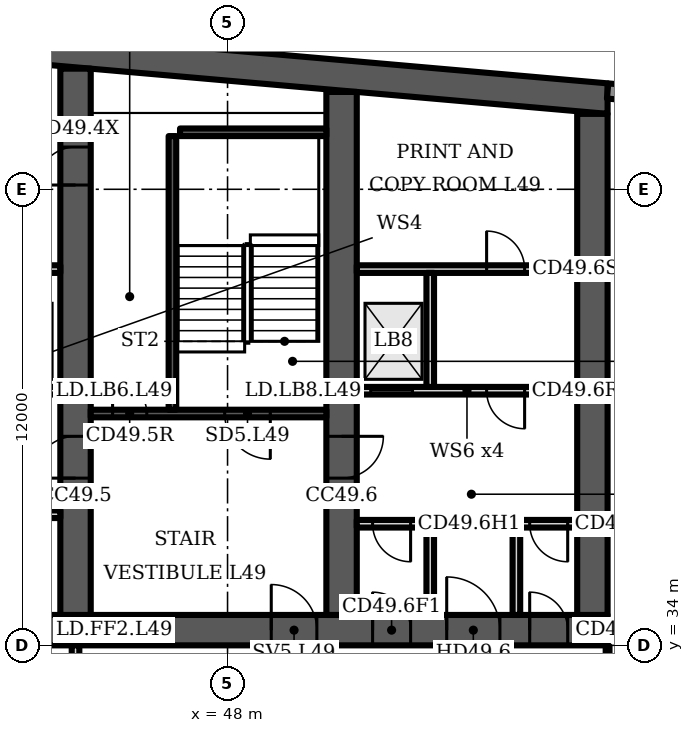
"""IFC4 building model, lengths in metres.
Left out: names, types, materials, properties, quantities, classifications, styles, units other than length and angle.
Written with IfcOpenShell. Run it as: python <this file> out.ifc"""

import sys

from ifc_helpers import new_model, si_unit, direction, frame, frame_2d, origin, place, context, subcontext, project, spatial, polyline, rectangle, outline, extrude, element, fill, save


model = new_model("IFC4")
c1 = context("Model", 3, precision=1e-05, world=origin(), true_north=direction((0.0, 1.0)))
c2 = subcontext(c1, "Body", "Model", "MODEL_VIEW")
j1 = project(units=[si_unit("LENGTHUNIT", "METRE"), si_unit("PLANEANGLEUNIT", "RADIAN")], contexts=[c1])
p1 = place(None, origin())
s1 = spatial("IfcSite", under=j1, at=p1, CompositionType="ELEMENT")
p2 = place(p1, origin())
s2 = spatial("IfcBuilding", under=s1, at=p2, CompositionType="ELEMENT")
p3 = place(p2, frame((0.0, 0.0, 198.7)))
s3 = spatial("IfcBuildingStorey", under=s2, at=p3, CompositionType="ELEMENT", Elevation=198.7)
p4 = place(p3, origin())
e1 = element("IfcWall", 1, at=p4, inside=s3, PredefinedType="SHEAR", context=c2, shape_type="SweptSolid", body=[
    extrude(outline(polyline([(16.0, 47.984), (37.0, 49.822), (58.0, 47.984), (58.0, 48.787), (37.0, 50.625), (16.0, 48.787), (16.0, 47.984)])), origin(), (0.0, 0.0, 1.0), 3.6),
])
p5 = place(p3, frame((16.0, 34.4, 0.0), z_axis=(0.0, 0.0, 1.0), x_axis=(1.0, 0.0, 0.0)))
e2 = element("IfcWall", 2, at=p5, inside=s3, PredefinedType="SHEAR", context=c2, shape_type="SweptSolid", body=[
    extrude(rectangle(XDim=42.0, YDim=0.8, at=frame_2d((21.0, 0.0))), origin(), (0.0, 0.0, 1.0), 3.6),
])
p6 = place(p5, frame((1.75, 0.0, 0.0)))
e3 = element("IfcOpeningElement", 3, at=p6, cuts=e2, PredefinedType="OPENING", context=c2, shape_type="SweptSolid", body=[
    extrude(rectangle(XDim=1.0, YDim=2.1, at=frame_2d((0.5, 1.05))), frame((0.0, 0.41, 0.0), z_axis=(0.0, -1.0, 0.0), x_axis=(1.0, 0.0, 0.0)), (0.0, 0.0, 1.0), 0.82),
])
p7 = place(p5, frame((4.65, 0.0, 0.0)))
e4 = element("IfcOpeningElement", 4, at=p7, cuts=e2, PredefinedType="OPENING", context=c2, shape_type="SweptSolid", body=[
    extrude(rectangle(XDim=1.0, YDim=2.1, at=frame_2d((0.5, 1.05))), frame((0.0, 0.41, 0.0), z_axis=(0.0, -1.0, 0.0), x_axis=(1.0, 0.0, 0.0)), (0.0, 0.0, 1.0), 0.82),
])
p8 = place(p5, frame((7.65, 0.0, 0.0)))
e5 = element("IfcOpeningElement", 5, at=p8, cuts=e2, PredefinedType="OPENING", context=c2, shape_type="SweptSolid", body=[
    extrude(rectangle(XDim=1.2, YDim=2.1, at=frame_2d((0.6, 1.05))), frame((0.0, 0.41, 0.0), z_axis=(0.0, -1.0, 0.0), x_axis=(1.0, 0.0, 0.0)), (0.0, 0.0, 1.0), 0.82),
])
p9 = place(p5, frame((14.767, 0.0, 0.0)))
e6 = element("IfcOpeningElement", 6, at=p9, cuts=e2, PredefinedType="OPENING", context=c2, shape_type="SweptSolid", body=[
    extrude(rectangle(XDim=1.1, YDim=2.1, at=frame_2d((0.55, 1.05))), frame((0.0, 0.41, 0.0), z_axis=(0.0, -1.0, 0.0), x_axis=(1.0, 0.0, 0.0)), (0.0, 0.0, 1.0), 0.82),
])
p10 = place(p5, frame((19.133, 0.0, 0.0)))
e7 = element("IfcOpeningElement", 7, at=p10, cuts=e2, PredefinedType="OPENING", context=c2, shape_type="SweptSolid", body=[
    extrude(rectangle(XDim=1.1, YDim=2.1, at=frame_2d((0.55, 1.05))), frame((0.0, 0.41, 0.0), z_axis=(0.0, -1.0, 0.0), x_axis=(1.0, 0.0, 0.0)), (0.0, 0.0, 1.0), 0.82),
])
p11 = place(p5, frame((16.8, 0.0, 0.0)))
e8 = element("IfcOpeningElement", 8, at=p11, cuts=e2, PredefinedType="OPENING", context=c2, shape_type="SweptSolid", body=[
    extrude(rectangle(XDim=1.4, YDim=2.1, at=frame_2d((0.7, 1.05))), frame((0.0, 0.41, 0.0), z_axis=(0.0, -1.0, 0.0), x_axis=(1.0, 0.0, 0.0)), (0.0, 0.0, 1.0), 0.82),
])
p12 = place(p5, frame((21.767, 0.0, 0.0)))
e9 = element("IfcOpeningElement", 9, at=p12, cuts=e2, PredefinedType="OPENING", context=c2, shape_type="SweptSolid", body=[
    extrude(rectangle(XDim=1.1, YDim=2.1, at=frame_2d((0.55, 1.05))), frame((0.0, 0.41, 0.0), z_axis=(0.0, -1.0, 0.0), x_axis=(1.0, 0.0, 0.0)), (0.0, 0.0, 1.0), 0.82),
])
p13 = place(p5, frame((23.95, 0.0, 0.0)))
e10 = element("IfcOpeningElement", 10, at=p13, cuts=e2, PredefinedType="OPENING", context=c2, shape_type="SweptSolid", body=[
    extrude(rectangle(XDim=1.1, YDim=2.1, at=frame_2d((0.55, 1.05))), frame((0.0, 0.41, 0.0), z_axis=(0.0, -1.0, 0.0), x_axis=(1.0, 0.0, 0.0)), (0.0, 0.0, 1.0), 0.82),
])
p14 = place(p5, frame((26.133, 0.0, 0.0)))
e11 = element("IfcOpeningElement", 11, at=p14, cuts=e2, PredefinedType="OPENING", context=c2, shape_type="SweptSolid", body=[
    extrude(rectangle(XDim=1.1, YDim=2.1, at=frame_2d((0.55, 1.05))), frame((0.0, 0.41, 0.0), z_axis=(0.0, -1.0, 0.0), x_axis=(1.0, 0.0, 0.0)), (0.0, 0.0, 1.0), 0.82),
])
p15 = place(p5, frame((33.15, 0.0, 0.0)))
e12 = element("IfcOpeningElement", 12, at=p15, cuts=e2, PredefinedType="OPENING", context=c2, shape_type="SweptSolid", body=[
    extrude(rectangle(XDim=1.2, YDim=2.1, at=frame_2d((0.6, 1.05))), frame((0.0, 0.41, 0.0), z_axis=(0.0, -1.0, 0.0), x_axis=(1.0, 0.0, 0.0)), (0.0, 0.0, 1.0), 0.82),
])
p16 = place(p5, frame((35.817, 0.0, 0.0)))
e13 = element("IfcOpeningElement", 13, at=p16, cuts=e2, PredefinedType="OPENING", context=c2, shape_type="SweptSolid", body=[
    extrude(rectangle(XDim=1.0, YDim=2.1, at=frame_2d((0.5, 1.05))), frame((0.0, 0.41, 0.0), z_axis=(0.0, -1.0, 0.0), x_axis=(1.0, 0.0, 0.0)), (0.0, 0.0, 1.0), 0.82),
])
p17 = place(p5, frame((39.95, 0.0, 0.0)))
e14 = element("IfcOpeningElement", 14, at=p17, cuts=e2, PredefinedType="OPENING", context=c2, shape_type="SweptSolid", body=[
    extrude(rectangle(XDim=1.0, YDim=2.1, at=frame_2d((0.5, 1.05))), frame((0.0, 0.41, 0.0), z_axis=(0.0, -1.0, 0.0), x_axis=(1.0, 0.0, 0.0)), (0.0, 0.0, 1.0), 0.82),
])
p18 = place(p5, frame((37.767, 0.0, 0.0)))
e15 = element("IfcOpeningElement", 15, at=p18, cuts=e2, PredefinedType="OPENING", context=c2, shape_type="SweptSolid", body=[
    extrude(rectangle(XDim=1.4, YDim=2.1, at=frame_2d((0.7, 1.05))), frame((0.0, 0.41, 0.0), z_axis=(0.0, -1.0, 0.0), x_axis=(1.0, 0.0, 0.0)), (0.0, 0.0, 1.0), 0.82),
])
p19 = place(p3, frame((44.0, 34.8, 0.0), z_axis=(0.0, 0.0, 1.0), x_axis=(0.0, 1.0, 0.0)))
e16 = element("IfcWall", 16, at=p19, inside=s3, PredefinedType="SHEAR", context=c2, shape_type="SweptSolid", body=[
    extrude(rectangle(XDim=14.374, YDim=0.8, at=frame_2d((7.187, 0.0))), origin(), (0.0, 0.0, 1.0), 3.6),
])
p20 = place(p19, frame((11.312, 0.0, 0.0)))
e17 = element("IfcOpeningElement", 17, at=p20, cuts=e16, PredefinedType="OPENING", context=c2, shape_type="SweptSolid", body=[
    extrude(rectangle(XDim=1.0, YDim=2.1, at=frame_2d((0.5, 1.05))), frame((0.0, 0.41, 0.0), z_axis=(0.0, -1.0, 0.0), x_axis=(1.0, 0.0, 0.0)), (0.0, 0.0, 1.0), 0.82),
])
p21 = place(p19, frame((3.6, 0.0, 0.0)))
e18 = element("IfcOpeningElement", 18, at=p21, cuts=e16, PredefinedType="OPENING", context=c2, shape_type="SweptSolid", body=[
    extrude(rectangle(XDim=1.1, YDim=2.1, at=frame_2d((0.55, 1.05))), frame((0.0, 0.41, 0.0), z_axis=(0.0, -1.0, 0.0), x_axis=(1.0, 0.0, 0.0)), (0.0, 0.0, 1.0), 0.82),
])
p22 = place(p3, frame((51.0, 34.8, 0.0), z_axis=(0.0, 0.0, 1.0), x_axis=(0.0, 1.0, 0.0)))
e19 = element("IfcWall", 19, at=p22, inside=s3, PredefinedType="SHEAR", context=c2, shape_type="SweptSolid", body=[
    extrude(rectangle(XDim=13.762, YDim=0.8, at=frame_2d((6.881, 0.0))), origin(), (0.0, 0.0, 1.0), 3.6),
])
p23 = place(p22, frame((3.6, 0.0, 0.0)))
e20 = element("IfcOpeningElement", 20, at=p23, cuts=e19, PredefinedType="OPENING", context=c2, shape_type="SweptSolid", body=[
    extrude(rectangle(XDim=1.1, YDim=2.1, at=frame_2d((0.55, 1.05))), frame((0.0, 0.41, 0.0), z_axis=(0.0, -1.0, 0.0), x_axis=(1.0, 0.0, 0.0)), (0.0, 0.0, 1.0), 0.82),
])
p24 = place(p3, frame((57.6, 34.8, 0.0), z_axis=(0.0, 0.0, 1.0), x_axis=(0.0, 1.0, 0.0)))
e21 = element("IfcWall", 21, at=p24, inside=s3, PredefinedType="SHEAR", context=c2, shape_type="SweptSolid", body=[
    extrude(rectangle(XDim=13.184, YDim=0.8, at=frame_2d((6.592, 0.0))), origin(), (0.0, 0.0, 1.0), 3.6),
])
p25 = place(p3, frame((60.983, 48.326, 0.0), z_axis=(0.0, 0.0, 1.0), x_axis=(-0.996194, 0.087168, 0.0)))
e22 = element("IfcWall", 22, at=p25, inside=s3, PredefinedType="SOLIDWALL", context=c2, shape_type="SweptSolid", body=[
    extrude(rectangle(XDim=2.994, YDim=0.4, at=frame_2d((1.497, 0.0))), origin(), (0.0, 0.0, 1.0), 3.15),
])
p26 = place(p3, frame((37.4, 40.7, 0.0), z_axis=(0.0, 0.0, 1.0), x_axis=(1.0, 0.0, 0.0)))
e23 = element("IfcWall", 23, at=p26, inside=s3, PredefinedType="PARTITIONING", context=c2, shape_type="SweptSolid", body=[
    extrude(rectangle(XDim=6.2, YDim=0.2, at=frame_2d((3.1, 0.0))), origin(), (0.0, 0.0, 1.0), 3.15),
])
p27 = place(p26, frame((0.367, 0.0, 0.0)))
e24 = element("IfcOpeningElement", 24, at=p27, cuts=e23, PredefinedType="OPENING", context=c2, shape_type="SweptSolid", body=[
    extrude(rectangle(XDim=1.1, YDim=2.1, at=frame_2d((0.55, 1.05))), frame((0.0, 0.11, 0.0), z_axis=(0.0, -1.0, 0.0), x_axis=(1.0, 0.0, 0.0)), (0.0, 0.0, 1.0), 0.22),
])
p28 = place(p26, frame((2.55, 0.0, 0.0)))
e25 = element("IfcOpeningElement", 25, at=p28, cuts=e23, PredefinedType="OPENING", context=c2, shape_type="SweptSolid", body=[
    extrude(rectangle(XDim=1.1, YDim=2.1, at=frame_2d((0.55, 1.05))), frame((0.0, 0.11, 0.0), z_axis=(0.0, -1.0, 0.0), x_axis=(1.0, 0.0, 0.0)), (0.0, 0.0, 1.0), 0.22),
])
p29 = place(p26, frame((4.733, 0.0, 0.0)))
e26 = element("IfcOpeningElement", 26, at=p29, cuts=e23, PredefinedType="OPENING", context=c2, shape_type="SweptSolid", body=[
    extrude(rectangle(XDim=1.1, YDim=2.1, at=frame_2d((0.55, 1.05))), frame((0.0, 0.11, 0.0), z_axis=(0.0, -1.0, 0.0), x_axis=(1.0, 0.0, 0.0)), (0.0, 0.0, 1.0), 0.22),
])
p30 = place(p3, origin())
e27 = element("IfcWall", 27, at=p30, inside=s3, PredefinedType="PARTITIONING", context=c2, shape_type="SweptSolid", body=[
    extrude(outline(polyline([(41.567, 37.1), (39.433, 37.1), (39.433, 34.8), (39.233, 34.8), (39.233, 37.65), (37.4, 37.65), (37.4, 37.85), (39.233, 37.85), (39.433, 37.85), (39.433, 37.3), (41.567, 37.3), (41.567, 37.55), (41.767, 37.55), (43.6, 37.55), (43.6, 37.35), (41.767, 37.35), (41.767, 34.8), (41.567, 34.8), (41.567, 37.1)])), origin(), (0.0, 0.0, 1.0), 3.15),
])
p31 = place(p3, origin())
e28 = element("IfcWall", 28, at=p31, inside=s3, PredefinedType="PARTITIONING", context=c2, shape_type="SweptSolid", body=[
    extrude(outline(polyline([(39.433, 40.8), (39.233, 40.8), (39.233, 43.8), (37.4, 43.8), (37.4, 44.0), (43.6, 44.0), (43.6, 43.8), (41.767, 43.8), (41.767, 40.8), (41.567, 40.8), (41.567, 43.8), (39.433, 43.8), (39.433, 40.8)])), origin(), (0.0, 0.0, 1.0), 3.15),
])
p32 = place(p3, frame((44.4, 40.1, 0.0), z_axis=(0.0, 0.0, 1.0), x_axis=(1.0, 0.0, 0.0)))
e29 = element("IfcWall", 29, at=p32, inside=s3, PredefinedType="SHEAR", context=c2, shape_type="SweptSolid", body=[
    extrude(rectangle(XDim=6.2, YDim=0.2, at=frame_2d((3.1, 0.0))), origin(), (0.0, 0.0, 1.0), 3.15),
])
p33 = place(p32, frame((3.525, 0.0, 0.0)))
e30 = element("IfcOpeningElement", 30, at=p33, cuts=e29, PredefinedType="OPENING", context=c2, shape_type="SweptSolid", body=[
    extrude(rectangle(XDim=1.2, YDim=2.1, at=frame_2d((0.6, 1.05))), frame((0.0, 0.11, 0.0), z_axis=(0.0, -1.0, 0.0), x_axis=(1.0, 0.0, 0.0)), (0.0, 0.0, 1.0), 0.22),
])
p34 = place(p32, frame((0.575, 0.0, 0.0)))
e31 = element("IfcOpeningElement", 31, at=p34, cuts=e29, PredefinedType="OPENING", context=c2, shape_type="SweptSolid", body=[
    extrude(rectangle(XDim=0.9, YDim=2.1, at=frame_2d((0.45, 1.05))), frame((0.0, 0.11, 0.0), z_axis=(0.0, -1.0, 0.0), x_axis=(1.0, 0.0, 0.0)), (0.0, 0.0, 1.0), 0.22),
])
p35 = place(p3, frame((46.55, 40.2, 0.0), z_axis=(0.0, 0.0, 1.0), x_axis=(0.0, 1.0, 0.0)))
e32 = element("IfcWall", 32, at=p35, inside=s3, PredefinedType="SHEAR", context=c2, shape_type="SweptSolid", body=[
    extrude(rectangle(XDim=7.2, YDim=0.2, at=frame_2d((3.6, 0.0))), origin(), (0.0, 0.0, 1.0), 3.15),
])
p36 = place(p3, frame((46.75, 47.5, 0.0), z_axis=(0.0, 0.0, 1.0), x_axis=(1.0, 0.0, 0.0)))
e33 = element("IfcWall", 33, at=p36, inside=s3, PredefinedType="SHEAR", context=c2, shape_type="SweptSolid", body=[
    extrude(rectangle(XDim=3.85, YDim=0.2, at=frame_2d((1.925, 0.0))), origin(), (0.0, 0.0, 1.0), 3.15),
])
p37 = place(p3, frame((51.4, 37.2, 0.0), z_axis=(0.0, 0.0, 1.0), x_axis=(1.0, 0.0, 0.0)))
e34 = element("IfcWall", 34, at=p37, inside=s3, PredefinedType="PARTITIONING", context=c2, shape_type="SweptSolid", body=[
    extrude(rectangle(XDim=1.833, YDim=0.2, at=frame_2d((0.917, 0.0))), origin(), (0.0, 0.0, 1.0), 3.15),
])
p38 = place(p37, frame((0.417, 0.0, 0.0)))
e35 = element("IfcOpeningElement", 35, at=p38, cuts=e34, PredefinedType="OPENING", context=c2, shape_type="SweptSolid", body=[
    extrude(rectangle(XDim=1.0, YDim=2.1, at=frame_2d((0.5, 1.05))), frame((0.0, 0.11, 0.0), z_axis=(0.0, -1.0, 0.0), x_axis=(1.0, 0.0, 0.0)), (0.0, 0.0, 1.0), 0.22),
])
p39 = place(p3, frame((55.7, 37.2, 0.0), z_axis=(0.0, 0.0, 1.0), x_axis=(1.0, 0.0, 0.0)))
e36 = element("IfcWall", 36, at=p39, inside=s3, PredefinedType="PARTITIONING", context=c2, shape_type="SweptSolid", body=[
    extrude(rectangle(XDim=1.5, YDim=0.2, at=frame_2d((0.75, 0.0))), origin(), (0.0, 0.0, 1.0), 3.15),
])
p40 = place(p39, frame((0.25, 0.0, 0.0)))
e37 = element("IfcOpeningElement", 37, at=p40, cuts=e36, PredefinedType="OPENING", context=c2, shape_type="SweptSolid", body=[
    extrude(rectangle(XDim=1.0, YDim=2.1, at=frame_2d((0.5, 1.05))), frame((0.0, 0.11, 0.0), z_axis=(0.0, -1.0, 0.0), x_axis=(1.0, 0.0, 0.0)), (0.0, 0.0, 1.0), 0.22),
])
p41 = place(p3, frame((51.4, 40.7, 0.0), z_axis=(0.0, 0.0, 1.0), x_axis=(1.0, 0.0, 0.0)))
e38 = element("IfcWall", 38, at=p41, inside=s3, PredefinedType="PARTITIONING", context=c2, shape_type="SweptSolid", body=[
    extrude(rectangle(XDim=5.8, YDim=0.2, at=frame_2d((2.9, 0.0))), origin(), (0.0, 0.0, 1.0), 3.15),
])
p42 = place(p41, frame((0.367, 0.0, 0.0)))
e39 = element("IfcOpeningElement", 39, at=p42, cuts=e38, PredefinedType="OPENING", context=c2, shape_type="SweptSolid", body=[
    extrude(rectangle(XDim=1.1, YDim=2.1, at=frame_2d((0.55, 1.05))), frame((0.0, 0.11, 0.0), z_axis=(0.0, -1.0, 0.0), x_axis=(1.0, 0.0, 0.0)), (0.0, 0.0, 1.0), 0.22),
])
p43 = place(p41, frame((3.417, 0.0, 0.0)))
e40 = element("IfcOpeningElement", 40, at=p43, cuts=e38, PredefinedType="OPENING", context=c2, shape_type="SweptSolid", body=[
    extrude(rectangle(XDim=1.0, YDim=2.1, at=frame_2d((0.5, 1.05))), frame((0.0, 0.11, 0.0), z_axis=(0.0, -1.0, 0.0), x_axis=(1.0, 0.0, 0.0)), (0.0, 0.0, 1.0), 0.22),
])
p44 = place(p3, frame((51.4, 43.9, 0.0), z_axis=(0.0, 0.0, 1.0), x_axis=(1.0, 0.0, 0.0)))
e41 = element("IfcWall", 41, at=p44, inside=s3, PredefinedType="PARTITIONING", context=c2, shape_type="SweptSolid", body=[
    extrude(rectangle(XDim=5.8, YDim=0.2, at=frame_2d((2.9, 0.0))), origin(), (0.0, 0.0, 1.0), 3.15),
])
p45 = place(p44, frame((3.417, 0.0, 0.0)))
e42 = element("IfcOpeningElement", 42, at=p45, cuts=e41, PredefinedType="OPENING", context=c2, shape_type="SweptSolid", body=[
    extrude(rectangle(XDim=1.0, YDim=2.1, at=frame_2d((0.5, 1.05))), frame((0.0, 0.11, 0.0), z_axis=(0.0, -1.0, 0.0), x_axis=(1.0, 0.0, 0.0)), (0.0, 0.0, 1.0), 0.22),
])
p46 = place(p3, origin())
e43 = element("IfcWall", 43, at=p46, inside=s3, PredefinedType="PARTITIONING", context=c2, shape_type="SweptSolid", body=[
    extrude(outline(polyline([(53.233, 34.8), (53.233, 37.3), (53.433, 37.3), (53.433, 34.8), (53.233, 34.8)])), origin(), (0.0, 0.0, 1.0), 3.15),
])
p47 = place(p3, origin())
e44 = element("IfcWall", 44, at=p47, inside=s3, PredefinedType="PARTITIONING", context=c2, shape_type="SweptSolid", body=[
    extrude(outline(polyline([(55.5, 34.8), (55.5, 37.3), (55.7, 37.3), (55.7, 34.8), (55.5, 34.8)])), origin(), (0.0, 0.0, 1.0), 3.15),
])
p48 = place(p3, origin())
e45 = element("IfcWall", 45, at=p48, inside=s3, PredefinedType="PARTITIONING", context=c2, shape_type="SweptSolid", body=[
    extrude(outline(polyline([(53.433, 40.8), (53.433, 43.8), (53.233, 43.8), (53.233, 40.8), (53.433, 40.8)])), origin(), (0.0, 0.0, 1.0), 3.15),
])
p49 = place(p3, frame((44.0, 30.5, 0.0), z_axis=(0.0, 0.0, 1.0), x_axis=(0.0, 1.0, 0.0)))
e46 = element("IfcWall", 46, at=p49, inside=s3, PredefinedType="PARTITIONING", context=c2, shape_type="SweptSolid", body=[
    extrude(rectangle(XDim=3.5, YDim=0.2, at=frame_2d((1.75, 0.0))), origin(), (0.0, 0.0, 1.0), 3.15),
])
p50 = place(p49, frame((1.2, 0.0, 0.0)))
e47 = element("IfcOpeningElement", 47, at=p50, cuts=e46, PredefinedType="OPENING", context=c2, shape_type="SweptSolid", body=[
    extrude(rectangle(XDim=1.1, YDim=2.1, at=frame_2d((0.55, 1.05))), frame((0.0, 0.11, 0.0), z_axis=(0.0, -1.0, 0.0), x_axis=(1.0, 0.0, 0.0)), (0.0, 0.0, 1.0), 0.22),
])
p51 = place(p3, frame((58.0, 30.5, 0.0), z_axis=(0.0, 0.0, 1.0), x_axis=(0.0, 1.0, 0.0)))
e48 = element("IfcWall", 48, at=p51, inside=s3, PredefinedType="PARTITIONING", context=c2, shape_type="SweptSolid", body=[
    extrude(rectangle(XDim=3.48, YDim=0.1, at=frame_2d((1.74, 0.0))), origin(), (0.0, 0.0, 1.0), 3.15),
])
p52 = place(p20, origin())
e49 = element("IfcDoor", 49, at=p52, inside=s3, OperationType="SINGLE_SWING_LEFT", PredefinedType="DOOR", context=c2, shape_type="SweptSolid", body=[
    extrude(rectangle(XDim=1.0, YDim=2.1, at=frame_2d((0.5, 1.05))), frame((0.0, 0.4, 0.0), z_axis=(0.0, -1.0, 0.0), x_axis=(1.0, 0.0, 0.0)), (0.0, 0.0, 1.0), 0.8),
])
fill(e17, e49)
p53 = place(p33, origin())
e50 = element("IfcDoor", 50, at=p53, inside=s3, OperationType="SINGLE_SWING_RIGHT", PredefinedType="DOOR", context=c2, shape_type="SweptSolid", body=[
    extrude(rectangle(XDim=1.2, YDim=2.1, at=frame_2d((0.6, 1.05))), frame((0.0, 0.025, 0.0), z_axis=(0.0, -1.0, 0.0), x_axis=(1.0, 0.0, 0.0)), (0.0, 0.0, 1.0), 0.05),
])
fill(e30, e50)
p54 = place(p34, origin())
e51 = element("IfcDoor", 51, at=p54, inside=s3, OperationType="SINGLE_SWING_LEFT", PredefinedType="DOOR", context=c2, shape_type="SweptSolid", body=[
    extrude(rectangle(XDim=0.9, YDim=2.1, at=frame_2d((0.45, 1.05))), frame((0.0, 0.025, 0.0), z_axis=(0.0, -1.0, 0.0), x_axis=(1.0, 0.0, 0.0)), (0.0, 0.0, 1.0), 0.05),
])
fill(e31, e51)
p55 = place(p15, origin())
e52 = element("IfcDoor", 52, at=p55, inside=s3, OperationType="SINGLE_SWING_LEFT", PredefinedType="DOOR", context=c2, shape_type="SweptSolid", body=[
    extrude(rectangle(XDim=1.2, YDim=2.1, at=frame_2d((0.6, 1.05))), frame((0.0, 0.025, 0.0), z_axis=(0.0, -1.0, 0.0), x_axis=(1.0, 0.0, 0.0)), (0.0, 0.0, 1.0), 0.05),
])
fill(e12, e52)
p56 = place(p16, origin())
e53 = element("IfcDoor", 53, at=p56, inside=s3, OperationType="SINGLE_SWING_LEFT", PredefinedType="DOOR", context=c2, shape_type="SweptSolid", body=[
    extrude(rectangle(XDim=1.0, YDim=2.1, at=frame_2d((0.5, 1.05))), frame((0.0, 0.4, 0.0), z_axis=(0.0, -1.0, 0.0), x_axis=(1.0, 0.0, 0.0)), (0.0, 0.0, 1.0), 0.8),
])
fill(e13, e53)
p57 = place(p38, origin())
e54 = element("IfcDoor", 54, at=p57, inside=s3, OperationType="SINGLE_SWING_RIGHT", PredefinedType="DOOR", context=c2, shape_type="SweptSolid", body=[
    extrude(rectangle(XDim=1.0, YDim=2.1, at=frame_2d((0.5, 1.05))), frame((0.0, 0.025, 0.0), z_axis=(0.0, -1.0, 0.0), x_axis=(1.0, 0.0, 0.0)), (0.0, 0.0, 1.0), 0.05),
])
fill(e35, e54)
p58 = place(p17, origin())
e55 = element("IfcDoor", 55, at=p58, inside=s3, OperationType="SINGLE_SWING_LEFT", PredefinedType="DOOR", context=c2, shape_type="SweptSolid", body=[
    extrude(rectangle(XDim=1.0, YDim=2.1, at=frame_2d((0.5, 1.05))), frame((0.0, 0.4, 0.0), z_axis=(0.0, -1.0, 0.0), x_axis=(1.0, 0.0, 0.0)), (0.0, 0.0, 1.0), 0.8),
])
fill(e14, e55)
p59 = place(p40, origin())
e56 = element("IfcDoor", 56, at=p59, inside=s3, OperationType="SINGLE_SWING_RIGHT", PredefinedType="DOOR", context=c2, shape_type="SweptSolid", body=[
    extrude(rectangle(XDim=1.0, YDim=2.1, at=frame_2d((0.5, 1.05))), frame((0.0, 0.025, 0.0), z_axis=(0.0, -1.0, 0.0), x_axis=(1.0, 0.0, 0.0)), (0.0, 0.0, 1.0), 0.05),
])
fill(e37, e56)
p60 = place(p18, origin())
e57 = element("IfcDoor", 57, at=p60, inside=s3, OperationType="DOUBLE_DOOR_SINGLE_SWING", PredefinedType="DOOR", context=c2, shape_type="SweptSolid", body=[
    extrude(rectangle(XDim=1.4, YDim=2.1, at=frame_2d((0.7, 1.05))), frame((0.0, 0.025, 0.0), z_axis=(0.0, -1.0, 0.0), x_axis=(1.0, 0.0, 0.0)), (0.0, 0.0, 1.0), 0.05),
])
fill(e15, e57)
p61 = place(p42, origin())
e58 = element("IfcDoor", 58, at=p61, inside=s3, OperationType="DOUBLE_DOOR_SLIDING", PredefinedType="DOOR", context=c2, shape_type="SweptSolid", body=[
    extrude(rectangle(XDim=1.1, YDim=2.1, at=frame_2d((0.55, 1.05))), frame((0.0, 0.025, 0.0), z_axis=(0.0, -1.0, 0.0), x_axis=(1.0, 0.0, 0.0)), (0.0, 0.0, 1.0), 0.05),
])
fill(e39, e58)
p62 = place(p43, origin())
e59 = element("IfcDoor", 59, at=p62, inside=s3, OperationType="SINGLE_SWING_RIGHT", PredefinedType="DOOR", context=c2, shape_type="SweptSolid", body=[
    extrude(rectangle(XDim=1.0, YDim=2.1, at=frame_2d((0.5, 1.05))), frame((0.0, 0.025, 0.0), z_axis=(0.0, -1.0, 0.0), x_axis=(1.0, 0.0, 0.0)), (0.0, 0.0, 1.0), 0.05),
])
fill(e40, e59)
p63 = place(p45, origin())
e60 = element("IfcDoor", 60, at=p63, inside=s3, OperationType="SINGLE_SWING_LEFT", PredefinedType="DOOR", context=c2, shape_type="SweptSolid", body=[
    extrude(rectangle(XDim=1.0, YDim=2.1, at=frame_2d((0.5, 1.05))), frame((0.0, 0.025, 0.0), z_axis=(0.0, -1.0, 0.0), x_axis=(1.0, 0.0, 0.0)), (0.0, 0.0, 1.0), 0.05),
])
fill(e42, e60)
p64 = place(p21, origin())
e61 = element("IfcDoor", 61, at=p64, inside=s3, OperationType="SINGLE_SWING_LEFT", PredefinedType="DOOR", context=c2, shape_type="SweptSolid", body=[
    extrude(rectangle(XDim=1.1, YDim=2.1, at=frame_2d((0.55, 1.05))), frame((0.0, 0.025, 0.0), z_axis=(0.0, -1.0, 0.0), x_axis=(1.0, 0.0, 0.0)), (0.0, 0.0, 1.0), 0.05),
])
fill(e18, e61)
p65 = place(p23, origin())
e62 = element("IfcDoor", 62, at=p65, inside=s3, OperationType="SINGLE_SWING_RIGHT", PredefinedType="DOOR", context=c2, shape_type="SweptSolid", body=[
    extrude(rectangle(XDim=1.1, YDim=2.1, at=frame_2d((0.55, 1.05))), frame((0.0, 0.025, 0.0), z_axis=(0.0, -1.0, 0.0), x_axis=(1.0, 0.0, 0.0)), (0.0, 0.0, 1.0), 0.05),
])
fill(e20, e62)
save(model, sys.argv[1])
